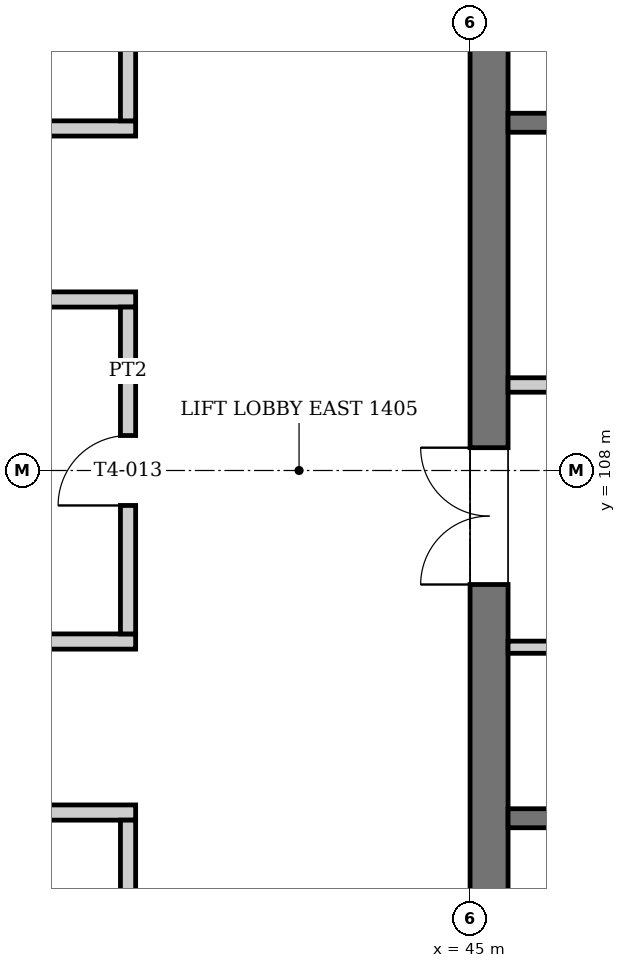
"""IFC4 building model, lengths in metres.
Left out: names, types, materials, properties, quantities, classifications, styles, units other than length and angle.
Written with IfcOpenShell. Run it as: python <this file> out.ifc"""

import sys

from ifc_helpers import new_model, si_unit, direction, frame, frame_2d, origin, place, context, subcontext, project, spatial, rectangle, extrude, element, fill, save


model = new_model("IFC4")
c1 = context("Model", 3, precision=1e-05, world=origin(), true_north=direction((0.0, 1.0)))
c2 = subcontext(c1, "Body", "Model", "MODEL_VIEW")
j1 = project(units=[si_unit("LENGTHUNIT", "METRE"), si_unit("PLANEANGLEUNIT", "RADIAN")], contexts=[c1])
p1 = place(None, origin())
s1 = spatial("IfcSite", under=j1, at=p1, CompositionType="ELEMENT")
p2 = place(p1, origin())
s2 = spatial("IfcBuilding", under=s1, at=p2, CompositionType="ELEMENT")
p3 = place(p2, frame((0.0, 0.0, 59.2)))
s3 = spatial("IfcBuildingStorey", under=s2, at=p3, CompositionType="ELEMENT", Elevation=59.2)
p4 = place(p3, frame((45.25, 99.0, 0.0), z_axis=(0.0, 0.0, 1.0), x_axis=(0.0, 1.0, 0.0)))
e1 = element("IfcWall", 1, at=p4, inside=s3, PredefinedType="SHEAR", context=c2, shape_type="SweptSolid", body=[
    extrude(rectangle(XDim=18.0, YDim=0.5, at=frame_2d((9.0, 0.0))), origin(), (0.0, 0.0, 1.0), 4.0),
])
p5 = place(p4, frame((1.5, 0.0, 0.0)))
e2 = element("IfcOpeningElement", 2, at=p5, cuts=e1, PredefinedType="OPENING", context=c2, shape_type="SweptSolid", body=[
    extrude(rectangle(XDim=1.8, YDim=2.1, at=frame_2d((0.9, 1.05))), frame((0.0, 0.26, 0.0), z_axis=(0.0, -1.0, 0.0), x_axis=(1.0, 0.0, 0.0)), (0.0, 0.0, 1.0), 0.52),
])
p6 = place(p4, frame((14.7, 0.0, 0.0)))
e3 = element("IfcOpeningElement", 3, at=p6, cuts=e1, PredefinedType="OPENING", context=c2, shape_type="SweptSolid", body=[
    extrude(rectangle(XDim=1.8, YDim=2.1, at=frame_2d((0.9, 1.05))), frame((0.0, 0.26, 0.0), z_axis=(0.0, -1.0, 0.0), x_axis=(1.0, 0.0, 0.0)), (0.0, 0.0, 1.0), 0.52),
])
p7 = place(p4, frame((7.5, 0.0, 0.0)))
e4 = element("IfcOpeningElement", 4, at=p7, cuts=e1, PredefinedType="OPENING", context=c2, shape_type="SweptSolid", body=[
    extrude(rectangle(XDim=1.8, YDim=2.1, at=frame_2d((0.9, 1.05))), frame((0.0, 0.26, 0.0), z_axis=(0.0, -1.0, 0.0), x_axis=(1.0, 0.0, 0.0)), (0.0, 0.0, 1.0), 0.52),
])
for number, where, z_axis, x_axis in (
    (5, (45.5, 103.425, 0.0), (0.0, 0.0, 1.0), (1.0, 0.0, 0.0)),
    (6, (45.5, 112.575, 0.0), (0.0, 0.0, 1.0), (1.0, 0.0, 0.0)),
):
    element("IfcWall", number, at=place(p3, frame(where, z_axis=z_axis, x_axis=x_axis)), inside=s3, PredefinedType="SOLIDWALL", context=c2, shape_type="SweptSolid", body=[
        extrude(rectangle(XDim=8.0, YDim=0.25, at=frame_2d((4.0, 0.0))), origin(), (0.0, 0.0, 1.0), 3.75),
    ])
p8 = place(p3, frame((45.5, 105.675, 0.0), z_axis=(0.0, 0.0, 1.0), x_axis=(1.0, 0.0, 0.0)))
e7 = element("IfcWall", 7, at=p8, inside=s3, PredefinedType="PARTITIONING", context=c2, shape_type="SweptSolid", body=[
    extrude(rectangle(XDim=2.6, YDim=0.16, at=frame_2d((1.3, 0.0))), origin(), (0.0, 0.0, 1.0), 3.75),
])
p9 = place(p8, frame((0.7, 0.0, 0.0)))
e8 = element("IfcOpeningElement", 8, at=p9, cuts=e7, PredefinedType="OPENING", context=c2, shape_type="SweptSolid", body=[
    extrude(rectangle(XDim=1.2, YDim=2.1, at=frame_2d((0.6, 1.05))), frame((0.0, 0.09, 0.0), z_axis=(0.0, -1.0, 0.0), x_axis=(1.0, 0.0, 0.0)), (0.0, 0.0, 1.0), 0.18),
])
p10 = place(p3, frame((45.5, 109.125, 0.0), z_axis=(0.0, 0.0, 1.0), x_axis=(1.0, 0.0, 0.0)))
e9 = element("IfcWall", 9, at=p10, inside=s3, PredefinedType="PARTITIONING", context=c2, shape_type="SweptSolid", body=[
    extrude(rectangle(XDim=2.6, YDim=0.19, at=frame_2d((1.3, 0.0))), origin(), (0.0, 0.0, 1.0), 3.75),
])
p11 = place(p10, frame((0.84, 0.0, 0.0)))
e10 = element("IfcOpeningElement", 10, at=p11, cuts=e9, PredefinedType="OPENING", context=c2, shape_type="SweptSolid", body=[
    extrude(rectangle(XDim=0.92, YDim=2.1, at=frame_2d((0.46, 1.05))), frame((0.0, 0.105, 0.0), z_axis=(0.0, -1.0, 0.0), x_axis=(1.0, 0.0, 0.0)), (0.0, 0.0, 1.0), 0.21),
])
p12 = place(p3, frame((13.4, 103.5, 0.0), z_axis=(0.0, 0.0, 1.0), x_axis=(1.0, 0.0, 0.0)))
e11 = element("IfcWall", 11, at=p12, inside=s3, PredefinedType="PARTITIONING", context=c2, shape_type="SweptSolid", body=[
    extrude(rectangle(XDim=27.2, YDim=0.2, at=frame_2d((13.6, 0.0))), origin(), (0.0, 0.0, 1.0), 3.05),
])
p13 = place(p12, frame((1.85, 0.0, 0.0)))
e12 = element("IfcOpeningElement", 12, at=p13, cuts=e11, PredefinedType="OPENING", context=c2, shape_type="SweptSolid", body=[
    extrude(rectangle(XDim=1.0, YDim=2.1, at=frame_2d((0.5, 1.05))), frame((0.0, 0.11, 0.0), z_axis=(0.0, -1.0, 0.0), x_axis=(1.0, 0.0, 0.0)), (0.0, 0.0, 1.0), 0.22),
])
p14 = place(p12, frame((6.35, 0.0, 0.0)))
e13 = element("IfcOpeningElement", 13, at=p14, cuts=e11, PredefinedType="OPENING", context=c2, shape_type="SweptSolid", body=[
    extrude(rectangle(XDim=1.0, YDim=2.1, at=frame_2d((0.5, 1.05))), frame((0.0, 0.11, 0.0), z_axis=(0.0, -1.0, 0.0), x_axis=(1.0, 0.0, 0.0)), (0.0, 0.0, 1.0), 0.22),
])
p15 = place(p12, frame((10.85, 0.0, 0.0)))
e14 = element("IfcOpeningElement", 14, at=p15, cuts=e11, PredefinedType="OPENING", context=c2, shape_type="SweptSolid", body=[
    extrude(rectangle(XDim=1.0, YDim=2.1, at=frame_2d((0.5, 1.05))), frame((0.0, 0.11, 0.0), z_axis=(0.0, -1.0, 0.0), x_axis=(1.0, 0.0, 0.0)), (0.0, 0.0, 1.0), 0.22),
])
p16 = place(p12, frame((15.35, 0.0, 0.0)))
e15 = element("IfcOpeningElement", 15, at=p16, cuts=e11, PredefinedType="OPENING", context=c2, shape_type="SweptSolid", body=[
    extrude(rectangle(XDim=1.0, YDim=2.1, at=frame_2d((0.5, 1.05))), frame((0.0, 0.11, 0.0), z_axis=(0.0, -1.0, 0.0), x_axis=(1.0, 0.0, 0.0)), (0.0, 0.0, 1.0), 0.22),
])
p17 = place(p12, frame((19.85, 0.0, 0.0)))
e16 = element("IfcOpeningElement", 16, at=p17, cuts=e11, PredefinedType="OPENING", context=c2, shape_type="SweptSolid", body=[
    extrude(rectangle(XDim=1.0, YDim=2.1, at=frame_2d((0.5, 1.05))), frame((0.0, 0.11, 0.0), z_axis=(0.0, -1.0, 0.0), x_axis=(1.0, 0.0, 0.0)), (0.0, 0.0, 1.0), 0.22),
])
p18 = place(p12, frame((24.45, 0.0, 0.0)))
e17 = element("IfcOpeningElement", 17, at=p18, cuts=e11, PredefinedType="OPENING", context=c2, shape_type="SweptSolid", body=[
    extrude(rectangle(XDim=0.8, YDim=2.1, at=frame_2d((0.4, 1.05))), frame((0.0, 0.11, 0.0), z_axis=(0.0, -1.0, 0.0), x_axis=(1.0, 0.0, 0.0)), (0.0, 0.0, 1.0), 0.22),
])
p19 = place(p3, frame((13.4, 105.75, 0.0), z_axis=(0.0, 0.0, 1.0), x_axis=(1.0, 0.0, 0.0)))
e18 = element("IfcWall", 18, at=p19, inside=s3, PredefinedType="PARTITIONING", context=c2, shape_type="SweptSolid", body=[
    extrude(rectangle(XDim=27.2, YDim=0.2, at=frame_2d((13.6, 0.0))), origin(), (0.0, 0.0, 1.0), 3.05),
])
p20 = place(p19, frame((12.9, 0.0, 0.0)))
e19 = element("IfcOpeningElement", 19, at=p20, cuts=e18, PredefinedType="OPENING", context=c2, shape_type="SweptSolid", body=[
    extrude(rectangle(XDim=1.4, YDim=2.1, at=frame_2d((0.7, 1.05))), frame((0.0, 0.11, 0.0), z_axis=(0.0, -1.0, 0.0), x_axis=(1.0, 0.0, 0.0)), (0.0, 0.0, 1.0), 0.22),
])
p21 = place(p3, frame((13.4, 110.25, 0.0), z_axis=(0.0, 0.0, 1.0), x_axis=(1.0, 0.0, 0.0)))
e20 = element("IfcWall", 20, at=p21, inside=s3, PredefinedType="PARTITIONING", context=c2, shape_type="SweptSolid", body=[
    extrude(rectangle(XDim=27.2, YDim=0.2, at=frame_2d((13.6, 0.0))), origin(), (0.0, 0.0, 1.0), 3.05),
])
p22 = place(p21, frame((12.9, 0.0, 0.0)))
e21 = element("IfcOpeningElement", 21, at=p22, cuts=e20, PredefinedType="OPENING", context=c2, shape_type="SweptSolid", body=[
    extrude(rectangle(XDim=1.4, YDim=2.1, at=frame_2d((0.7, 1.05))), frame((0.0, 0.11, 0.0), z_axis=(0.0, -1.0, 0.0), x_axis=(1.0, 0.0, 0.0)), (0.0, 0.0, 1.0), 0.22),
])
p23 = place(p3, frame((18.08, 112.5, 0.0), z_axis=(0.0, 0.0, 1.0), x_axis=(1.0, 0.0, 0.0)))
e22 = element("IfcWall", 22, at=p23, inside=s3, PredefinedType="PARTITIONING", context=c2, shape_type="SweptSolid", body=[
    extrude(rectangle(XDim=22.52, YDim=0.2, at=frame_2d((11.26, 0.0))), origin(), (0.0, 0.0, 1.0), 3.05),
])
p24 = place(p23, frame((1.67, 0.0, 0.0)))
e23 = element("IfcOpeningElement", 23, at=p24, cuts=e22, PredefinedType="OPENING", context=c2, shape_type="SweptSolid", body=[
    extrude(rectangle(XDim=1.0, YDim=2.1, at=frame_2d((0.5, 1.05))), frame((0.0, 0.11, 0.0), z_axis=(0.0, -1.0, 0.0), x_axis=(1.0, 0.0, 0.0)), (0.0, 0.0, 1.0), 0.22),
])
p25 = place(p23, frame((6.17, 0.0, 0.0)))
e24 = element("IfcOpeningElement", 24, at=p25, cuts=e22, PredefinedType="OPENING", context=c2, shape_type="SweptSolid", body=[
    extrude(rectangle(XDim=1.0, YDim=2.1, at=frame_2d((0.5, 1.05))), frame((0.0, 0.11, 0.0), z_axis=(0.0, -1.0, 0.0), x_axis=(1.0, 0.0, 0.0)), (0.0, 0.0, 1.0), 0.22),
])
p26 = place(p23, frame((10.67, 0.0, 0.0)))
e25 = element("IfcOpeningElement", 25, at=p26, cuts=e22, PredefinedType="OPENING", context=c2, shape_type="SweptSolid", body=[
    extrude(rectangle(XDim=1.0, YDim=2.1, at=frame_2d((0.5, 1.05))), frame((0.0, 0.11, 0.0), z_axis=(0.0, -1.0, 0.0), x_axis=(1.0, 0.0, 0.0)), (0.0, 0.0, 1.0), 0.22),
])
p27 = place(p23, frame((15.17, 0.0, 0.0)))
e26 = element("IfcOpeningElement", 26, at=p27, cuts=e22, PredefinedType="OPENING", context=c2, shape_type="SweptSolid", body=[
    extrude(rectangle(XDim=1.0, YDim=2.1, at=frame_2d((0.5, 1.05))), frame((0.0, 0.11, 0.0), z_axis=(0.0, -1.0, 0.0), x_axis=(1.0, 0.0, 0.0)), (0.0, 0.0, 1.0), 0.22),
])
p28 = place(p23, frame((19.77, 0.0, 0.0)))
e27 = element("IfcOpeningElement", 27, at=p28, cuts=e22, PredefinedType="OPENING", context=c2, shape_type="SweptSolid", body=[
    extrude(rectangle(XDim=0.8, YDim=2.1, at=frame_2d((0.4, 1.05))), frame((0.0, 0.11, 0.0), z_axis=(0.0, -1.0, 0.0), x_axis=(1.0, 0.0, 0.0)), (0.0, 0.0, 1.0), 0.22),
])
p29 = place(p3, frame((40.5, 99.075, 0.0), z_axis=(0.0, 0.0, 1.0), x_axis=(0.0, 1.0, 0.0)))
e28 = element("IfcWall", 28, at=p29, inside=s3, PredefinedType="PARTITIONING", context=c2, shape_type="SweptSolid", body=[
    extrude(rectangle(XDim=4.325, YDim=0.2, at=frame_2d((2.163, 0.0))), origin(), (0.0, 0.0, 1.0), 3.05),
])
p30 = place(p3, frame((40.5, 105.85, 0.0), z_axis=(0.0, 0.0, 1.0), x_axis=(0.0, 1.0, 0.0)))
e29 = element("IfcWall", 29, at=p30, inside=s3, PredefinedType="PARTITIONING", context=c2, shape_type="SweptSolid", body=[
    extrude(rectangle(XDim=4.3, YDim=0.2, at=frame_2d((2.15, 0.0))), origin(), (0.0, 0.0, 1.0), 3.05),
])
p31 = place(p30, frame((1.69, 0.0, 0.0)))
e30 = element("IfcOpeningElement", 30, at=p31, cuts=e29, PredefinedType="OPENING", context=c2, shape_type="SweptSolid", body=[
    extrude(rectangle(XDim=0.92, YDim=2.1, at=frame_2d((0.46, 1.05))), frame((0.0, 0.11, 0.0), z_axis=(0.0, -1.0, 0.0), x_axis=(1.0, 0.0, 0.0)), (0.0, 0.0, 1.0), 0.22),
])
p32 = place(p3, frame((40.5, 112.6, 0.0), z_axis=(0.0, 0.0, 1.0), x_axis=(0.0, 1.0, 0.0)))
e31 = element("IfcWall", 31, at=p32, inside=s3, PredefinedType="PARTITIONING", context=c2, shape_type="SweptSolid", body=[
    extrude(rectangle(XDim=4.31, YDim=0.2, at=frame_2d((2.155, 0.0))), origin(), (0.0, 0.0, 1.0), 3.05),
])
p33 = place(p31, origin())
e32 = element("IfcDoor", 32, at=p33, inside=s3, OperationType="SINGLE_SWING_LEFT", PredefinedType="DOOR", context=c2, shape_type="SweptSolid", body=[
    extrude(rectangle(XDim=0.92, YDim=2.1, at=frame_2d((0.46, 1.05))), frame((0.0, 0.025, 0.0), z_axis=(0.0, -1.0, 0.0), x_axis=(1.0, 0.0, 0.0)), (0.0, 0.0, 1.0), 0.05),
])
fill(e30, e32)
p34 = place(p7, origin())
e33 = element("IfcDoor", 33, at=p34, inside=s3, OperationType="DOUBLE_DOOR_SINGLE_SWING", PredefinedType="DOOR", context=c2, shape_type="SweptSolid", body=[
    extrude(rectangle(XDim=1.8, YDim=2.1, at=frame_2d((0.9, 1.05))), frame((0.0, 0.025, 0.0), z_axis=(0.0, -1.0, 0.0), x_axis=(1.0, 0.0, 0.0)), (0.0, 0.0, 1.0), 0.05),
])
fill(e4, e33)
save(model, sys.argv[1])
